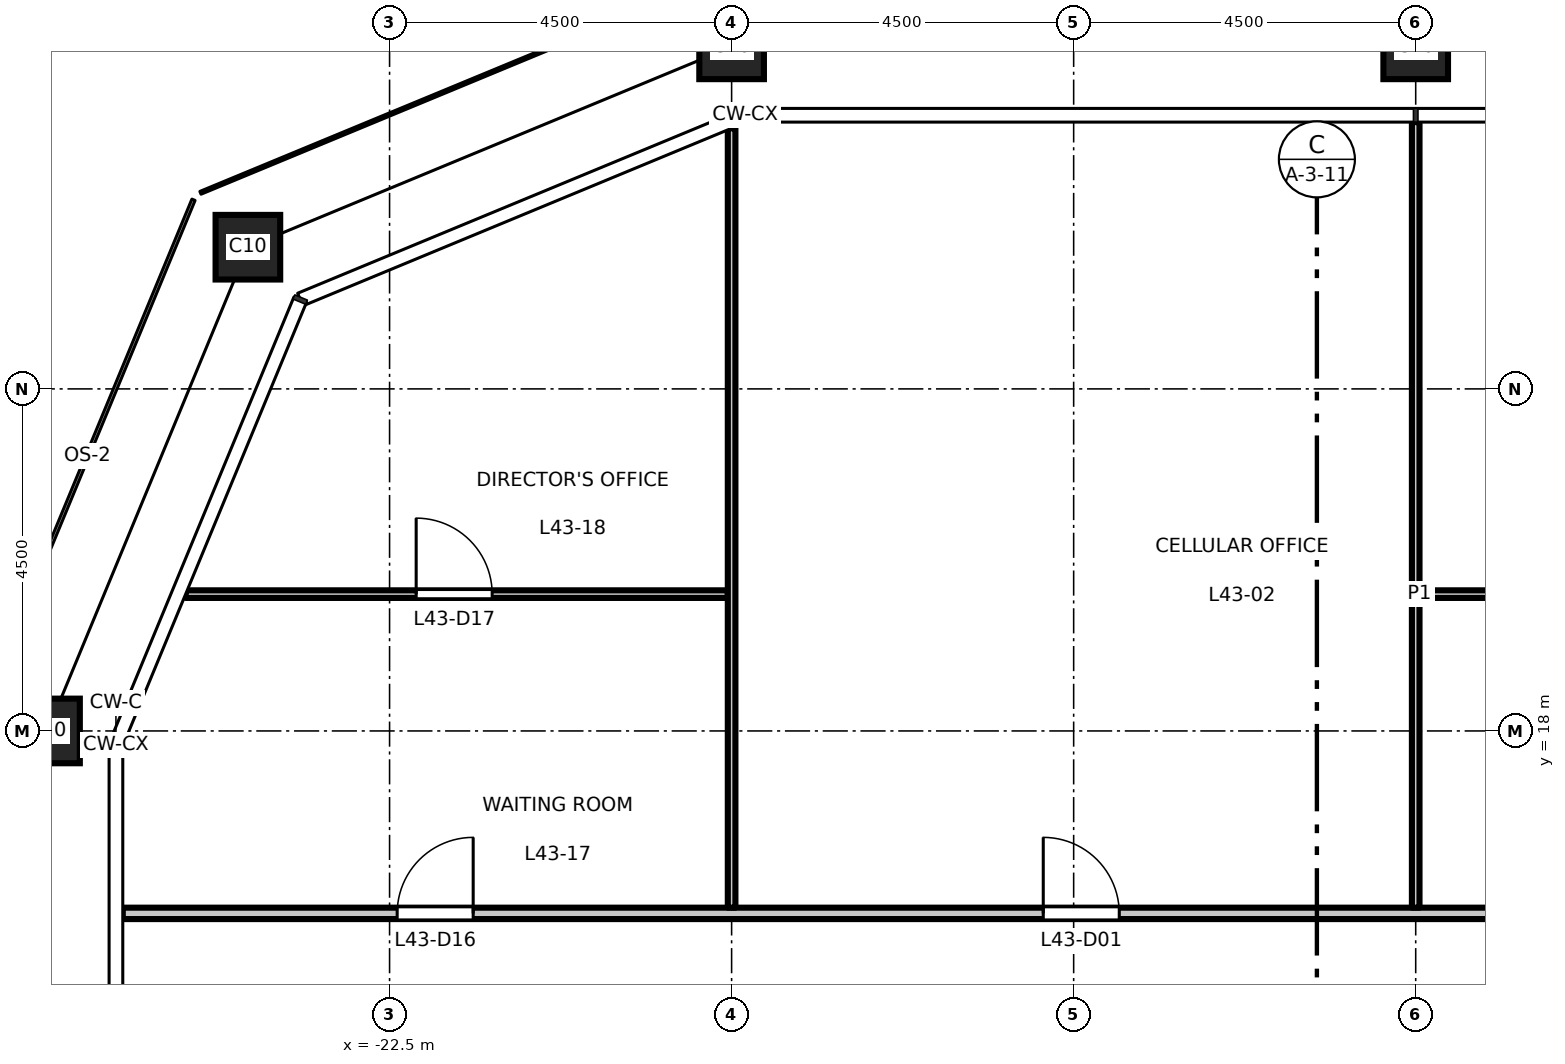
"""IFC4 building model, lengths in metres.
Left out: names, types, materials, properties, quantities, classifications, styles, units other than length and angle.
Written with IfcOpenShell. Run it as: python <this file> out.ifc"""

import sys

from ifc_helpers import new_model, si_unit, direction, frame, frame_2d, origin, origin_2d, place, context, subcontext, project, spatial, rectangle, hollow_rectangle, extrude, element, fill, save


model = new_model("IFC4")
c1 = context("Model", 3, precision=1e-05, world=origin(), true_north=direction((0.0, 1.0)))
c2 = subcontext(c1, "Body", "Model", "MODEL_VIEW")
j1 = project(units=[si_unit("LENGTHUNIT", "METRE"), si_unit("PLANEANGLEUNIT", "RADIAN")], contexts=[c1])
p1 = place(None, origin())
s1 = spatial("IfcSite", under=j1, at=p1, CompositionType="ELEMENT")
p2 = place(p1, origin())
s2 = spatial("IfcBuilding", under=s1, at=p2, CompositionType="ELEMENT")
p3 = place(p2, frame((0.0, 0.0, 201.7)))
s3 = spatial("IfcBuildingStorey", under=s2, at=p3, CompositionType="ELEMENT", Elevation=201.7)
for number, where, z_axis, x_axis in (
    (1, (-9.0, 27.0, 0.0), (0.0, 0.0, 1.0), (1.0, 0.0, 0.0)),
    (2, (-18.0, 27.0, 0.0), (0.0, 0.0, 1.0), (1.0, 0.0, 0.0)),
    (3, (-24.364, 24.364, 0.0), (0.0, 0.0, 1.0), (1.0, 0.0, 0.0)),
    (4, (-27.0, 18.0, 0.0), (0.0, 0.0, 1.0), (1.0, 0.0, 0.0)),
):
    element("IfcColumn", number, at=place(p3, frame(where, z_axis=z_axis, x_axis=x_axis)), inside=s3, PredefinedType="COLUMN", context=c2, shape_type="SweptSolid", body=[
        extrude(hollow_rectangle(XDim=0.85, YDim=0.85, WallThickness=0.05, at=origin_2d()), origin(), (0.0, 0.0, 1.0), 4.5),
    ])
p4 = place(p3, frame((-26.01, 15.6, 0.0), z_axis=(0.0, 0.0, 1.0), x_axis=(1.0, 0.0, 0.0)))
e5 = element("IfcWall", 5, at=p4, inside=s3, PredefinedType="PARTITIONING", context=c2, shape_type="SweptSolid", body=[
    extrude(rectangle(XDim=52.02, YDim=0.15, at=frame_2d((26.01, 0.0))), origin(), (0.0, 0.0, 1.0), 4.35),
])
p5 = place(p4, frame((12.11, 0.0, 0.0)))
e6 = element("IfcOpeningElement", 6, at=p5, cuts=e5, PredefinedType="OPENING", context=c2, shape_type="SweptSolid", body=[
    extrude(rectangle(XDim=1.0, YDim=2.1, at=frame_2d((0.5, 1.05))), frame((0.0, 0.085, 0.0), z_axis=(0.0, -1.0, 0.0), x_axis=(1.0, 0.0, 0.0)), (0.0, 0.0, 1.0), 0.17),
])
p6 = place(p4, frame((21.11, 0.0, 0.0)))
e7 = element("IfcOpeningElement", 7, at=p6, cuts=e5, PredefinedType="OPENING", context=c2, shape_type="SweptSolid", body=[
    extrude(rectangle(XDim=1.0, YDim=2.1, at=frame_2d((0.5, 1.05))), frame((0.0, 0.085, 0.0), z_axis=(0.0, -1.0, 0.0), x_axis=(1.0, 0.0, 0.0)), (0.0, 0.0, 1.0), 0.17),
])
p7 = place(p4, frame((27.86, 0.0, 0.0)))
e8 = element("IfcOpeningElement", 8, at=p7, cuts=e5, PredefinedType="OPENING", context=c2, shape_type="SweptSolid", body=[
    extrude(rectangle(XDim=1.0, YDim=2.1, at=frame_2d((0.5, 1.05))), frame((0.0, 0.085, 0.0), z_axis=(0.0, -1.0, 0.0), x_axis=(1.0, 0.0, 0.0)), (0.0, 0.0, 1.0), 0.17),
])
p8 = place(p4, frame((32.36, 0.0, 0.0)))
e9 = element("IfcOpeningElement", 9, at=p8, cuts=e5, PredefinedType="OPENING", context=c2, shape_type="SweptSolid", body=[
    extrude(rectangle(XDim=1.0, YDim=2.1, at=frame_2d((0.5, 1.05))), frame((0.0, 0.085, 0.0), z_axis=(0.0, -1.0, 0.0), x_axis=(1.0, 0.0, 0.0)), (0.0, 0.0, 1.0), 0.17),
])
p9 = place(p4, frame((39.11, 0.0, 0.0)))
e10 = element("IfcOpeningElement", 10, at=p9, cuts=e5, PredefinedType="OPENING", context=c2, shape_type="SweptSolid", body=[
    extrude(rectangle(XDim=1.0, YDim=2.1, at=frame_2d((0.5, 1.05))), frame((0.0, 0.085, 0.0), z_axis=(0.0, -1.0, 0.0), x_axis=(1.0, 0.0, 0.0)), (0.0, 0.0, 1.0), 0.17),
])
p10 = place(p4, frame((3.61, 0.0, 0.0)))
e11 = element("IfcOpeningElement", 11, at=p10, cuts=e5, PredefinedType="OPENING", context=c2, shape_type="SweptSolid", body=[
    extrude(rectangle(XDim=1.0, YDim=2.1, at=frame_2d((0.5, 1.05))), frame((0.0, 0.085, 0.0), z_axis=(0.0, -1.0, 0.0), x_axis=(1.0, 0.0, 0.0)), (0.0, 0.0, 1.0), 0.17),
])
p11 = place(p4, frame((47.62, 0.0, 0.0)))
e12 = element("IfcOpeningElement", 12, at=p11, cuts=e5, PredefinedType="OPENING", context=c2, shape_type="SweptSolid", body=[
    extrude(rectangle(XDim=1.0, YDim=2.1, at=frame_2d((0.5, 1.05))), frame((0.0, 0.085, 0.0), z_axis=(0.0, -1.0, 0.0), x_axis=(1.0, 0.0, 0.0)), (0.0, 0.0, 1.0), 0.17),
])
p12 = place(p3, frame((-25.183, 19.8, 0.0), z_axis=(0.0, 0.0, 1.0), x_axis=(1.0, 0.0, 0.0)))
e13 = element("IfcWall", 13, at=p12, inside=s3, PredefinedType="PARTITIONING", context=c2, shape_type="SweptSolid", body=[
    extrude(rectangle(XDim=7.133, YDim=0.1, at=frame_2d((3.566, 0.0))), origin(), (0.0, 0.0, 1.0), 4.35),
])
p13 = place(p12, frame((3.033, 0.0, 0.0)))
e14 = element("IfcOpeningElement", 14, at=p13, cuts=e13, PredefinedType="OPENING", context=c2, shape_type="SweptSolid", body=[
    extrude(rectangle(XDim=1.0, YDim=2.1, at=frame_2d((0.5, 1.05))), frame((0.0, 0.06, 0.0), z_axis=(0.0, -1.0, 0.0), x_axis=(1.0, 0.0, 0.0)), (0.0, 0.0, 1.0), 0.12),
])
p14 = place(p3, frame((-8.95, 19.8, 0.0), z_axis=(0.0, 0.0, 1.0), x_axis=(1.0, 0.0, 0.0)))
e15 = element("IfcWall", 15, at=p14, inside=s3, PredefinedType="PARTITIONING", context=c2, shape_type="SweptSolid", body=[
    extrude(rectangle(XDim=34.133, YDim=0.1, at=frame_2d((17.066, 0.0))), origin(), (0.0, 0.0, 1.0), 4.35),
])
p15 = place(p14, frame((4.05, 0.0, 0.0)))
e16 = element("IfcOpeningElement", 16, at=p15, cuts=e15, PredefinedType="OPENING", context=c2, shape_type="SweptSolid", body=[
    extrude(rectangle(XDim=1.0, YDim=2.1, at=frame_2d((0.5, 1.05))), frame((0.0, 0.06, 0.0), z_axis=(0.0, -1.0, 0.0), x_axis=(1.0, 0.0, 0.0)), (0.0, 0.0, 1.0), 0.12),
])
p16 = place(p14, frame((10.8, 0.0, 0.0)))
e17 = element("IfcOpeningElement", 17, at=p16, cuts=e15, PredefinedType="OPENING", context=c2, shape_type="SweptSolid", body=[
    extrude(rectangle(XDim=1.0, YDim=2.1, at=frame_2d((0.5, 1.05))), frame((0.0, 0.06, 0.0), z_axis=(0.0, -1.0, 0.0), x_axis=(1.0, 0.0, 0.0)), (0.0, 0.0, 1.0), 0.12),
])
p17 = place(p14, frame((22.05, 0.0, 0.0)))
e18 = element("IfcOpeningElement", 18, at=p17, cuts=e15, PredefinedType="OPENING", context=c2, shape_type="SweptSolid", body=[
    extrude(rectangle(XDim=1.0, YDim=2.1, at=frame_2d((0.5, 1.05))), frame((0.0, 0.06, 0.0), z_axis=(0.0, -1.0, 0.0), x_axis=(1.0, 0.0, 0.0)), (0.0, 0.0, 1.0), 0.12),
])
p18 = place(p14, frame((29.983, 0.0, 0.0)))
e19 = element("IfcOpeningElement", 19, at=p18, cuts=e15, PredefinedType="OPENING", context=c2, shape_type="SweptSolid", body=[
    extrude(rectangle(XDim=1.0, YDim=2.1, at=frame_2d((0.5, 1.05))), frame((0.0, 0.06, 0.0), z_axis=(0.0, -1.0, 0.0), x_axis=(1.0, 0.0, 0.0)), (0.0, 0.0, 1.0), 0.12),
])
p19 = place(p3, frame((-18.0, 15.675, 0.0), z_axis=(0.0, 0.0, 1.0), x_axis=(0.0, 1.0, 0.0)))
e20 = element("IfcWall", 20, at=p19, inside=s3, PredefinedType="PARTITIONING", context=c2, shape_type="SweptSolid", body=[
    extrude(rectangle(XDim=10.253, YDim=0.1, at=frame_2d((5.126, 0.0))), origin(), (0.0, 0.0, 1.0), 3.65),
])
p20 = place(p3, frame((-9.0, 15.675, 0.0), z_axis=(0.0, 0.0, 1.0), x_axis=(0.0, 1.0, 0.0)))
e21 = element("IfcWall", 21, at=p20, inside=s3, PredefinedType="PARTITIONING", context=c2, shape_type="SweptSolid", body=[
    extrude(rectangle(XDim=10.335, YDim=0.1, at=frame_2d((5.167, 0.0))), origin(), (0.0, 0.0, 1.0), 3.65),
])
p21 = place(p5, origin())
e22 = element("IfcDoor", 22, at=p21, inside=s3, OperationType="SINGLE_SWING_LEFT", PredefinedType="DOOR", context=c2, shape_type="SweptSolid", body=[
    extrude(rectangle(XDim=1.0, YDim=2.1, at=frame_2d((0.5, 1.05))), frame((0.0, 0.025, 0.0), z_axis=(0.0, -1.0, 0.0), x_axis=(1.0, 0.0, 0.0)), (0.0, 0.0, 1.0), 0.05),
])
fill(e6, e22)
p22 = place(p10, origin())
e23 = element("IfcDoor", 23, at=p22, inside=s3, OperationType="SINGLE_SWING_RIGHT", PredefinedType="DOOR", context=c2, shape_type="SweptSolid", body=[
    extrude(rectangle(XDim=1.0, YDim=2.1, at=frame_2d((0.5, 1.05))), frame((0.0, 0.025, 0.0), z_axis=(0.0, -1.0, 0.0), x_axis=(1.0, 0.0, 0.0)), (0.0, 0.0, 1.0), 0.05),
])
fill(e11, e23)
p23 = place(p13, origin())
e24 = element("IfcDoor", 24, at=p23, inside=s3, OperationType="SINGLE_SWING_LEFT", PredefinedType="DOOR", context=c2, shape_type="SweptSolid", body=[
    extrude(rectangle(XDim=1.0, YDim=2.1, at=frame_2d((0.5, 1.05))), frame((0.0, 0.025, 0.0), z_axis=(0.0, -1.0, 0.0), x_axis=(1.0, 0.0, 0.0)), (0.0, 0.0, 1.0), 0.05),
])
fill(e14, e24)
save(model, sys.argv[1])
